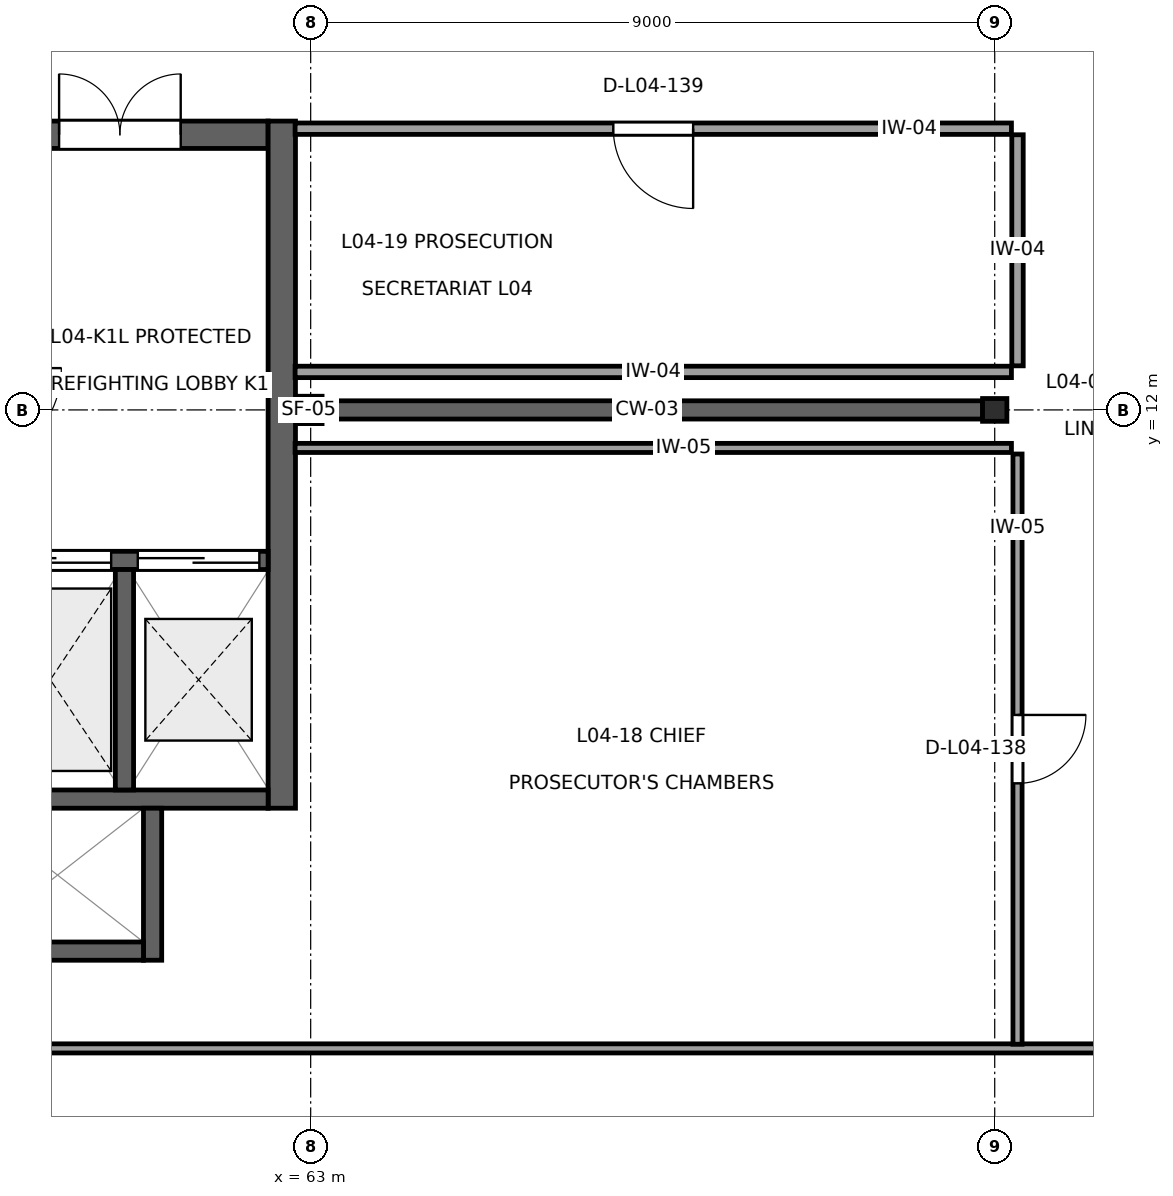
"""IFC4 building model, lengths in metres.
Left out: names, types, materials, properties, quantities, classifications, styles, units other than length and angle.
Written with IfcOpenShell. Run it as: python <this file> out.ifc"""

import sys

from ifc_helpers import new_model, si_unit, direction, frame, frame_2d, origin, origin_2d, place, context, subcontext, project, spatial, rectangle, i_section, extrude, element, fill, save


model = new_model("IFC4")
c1 = context("Model", 3, precision=1e-05, world=origin(), true_north=direction((0.0, 1.0)))
c2 = subcontext(c1, "Body", "Model", "MODEL_VIEW")
j1 = project(units=[si_unit("LENGTHUNIT", "METRE"), si_unit("PLANEANGLEUNIT", "RADIAN")], contexts=[c1])
p1 = place(None, origin())
s1 = spatial("IfcSite", under=j1, at=p1, CompositionType="ELEMENT")
p2 = place(p1, origin())
s2 = spatial("IfcBuilding", under=s1, at=p2, CompositionType="ELEMENT")
p3 = place(p2, frame((0.0, 0.0, 18.9)))
s3 = spatial("IfcBuildingStorey", under=s2, at=p3, CompositionType="ELEMENT", Elevation=18.9)
p4 = place(p3, frame((63.0, 12.0, 0.0), z_axis=(0.0, 0.0, 1.0), x_axis=(1.0, 0.0, 0.0)))
e1 = element("IfcColumn", 1, at=p4, inside=s3, PredefinedType="COLUMN", context=c2, shape_type="SweptSolid", body=[
    extrude(i_section(OverallWidth=0.3, OverallDepth=0.36, WebThickness=0.012, FlangeThickness=0.022, at=origin_2d()), origin(), (0.0, 0.0, 1.0), 4.5),
])
p5 = place(p3, frame((72.0, 12.0, 0.0), z_axis=(0.0, 0.0, 1.0), x_axis=(0.0, 1.0, 0.0)))
e2 = element("IfcColumn", 2, at=p5, inside=s3, PredefinedType="COLUMN", context=c2, shape_type="SweptSolid", body=[
    extrude(i_section(OverallWidth=0.3, OverallDepth=0.32, WebThickness=0.011, FlangeThickness=0.021, at=origin_2d()), origin(), (0.0, 0.0, 1.0), 4.5),
])
p6 = place(p3, frame((58.54, 15.62, 0.0), z_axis=(0.0, 0.0, 1.0), x_axis=(1.0, 0.0, 0.0)))
e3 = element("IfcWall", 3, at=p6, inside=s3, PredefinedType="SHEAR", context=c2, shape_type="SweptSolid", body=[
    extrude(rectangle(XDim=3.9, YDim=0.36, at=frame_2d((1.95, 0.0))), origin(), (0.0, 0.0, 1.0), 4.16),
])
p7 = place(p6, frame((1.15, 0.0, 0.0)))
e4 = element("IfcOpeningElement", 4, at=p7, cuts=e3, PredefinedType="OPENING", context=c2, shape_type="SweptSolid", body=[
    extrude(rectangle(XDim=1.6, YDim=2.25, at=frame_2d((0.8, 1.125))), frame((0.0, 0.195, 0.0), z_axis=(0.0, -1.0, 0.0), x_axis=(1.0, 0.0, 0.0)), (0.0, 0.0, 1.0), 0.39),
])
p8 = place(p3, frame((62.62, 6.76, 0.0), z_axis=(0.0, 0.0, 1.0), x_axis=(0.0, 1.0, 0.0)))
e5 = element("IfcWall", 5, at=p8, inside=s3, PredefinedType="SHEAR", context=c2, shape_type="SweptSolid", body=[
    extrude(rectangle(XDim=9.04, YDim=0.36, at=frame_2d((4.52, 0.0))), origin(), (0.0, 0.0, 1.0), 4.16),
])
p9 = place(p3, frame((58.54, 10.02, 0.0), z_axis=(0.0, 0.0, 1.0), x_axis=(1.0, 0.0, 0.0)))
e6 = element("IfcWall", 6, at=p9, inside=s3, PredefinedType="SHEAR", context=c2, shape_type="SweptSolid", body=[
    extrude(rectangle(XDim=3.9, YDim=0.24, at=frame_2d((1.95, 0.0))), origin(), (0.0, 0.0, 1.0), 4.31),
])
p10 = place(p9, frame((0.235, 0.0, 0.0)))
e7 = element("IfcOpeningElement", 7, at=p10, cuts=e6, PredefinedType="OPENING", context=c2, shape_type="SweptSolid", body=[
    extrude(rectangle(XDim=1.6, YDim=2.3, at=frame_2d((0.8, 1.15))), frame((0.0, 0.135, 0.0), z_axis=(0.0, -1.0, 0.0), x_axis=(1.0, 0.0, 0.0)), (0.0, 0.0, 1.0), 0.27),
])
p11 = place(p9, frame((2.185, 0.0, 0.0)))
e8 = element("IfcOpeningElement", 8, at=p11, cuts=e6, PredefinedType="OPENING", context=c2, shape_type="SweptSolid", body=[
    extrude(rectangle(XDim=1.6, YDim=2.3, at=frame_2d((0.8, 1.15))), frame((0.0, 0.135, 0.0), z_axis=(0.0, -1.0, 0.0), x_axis=(1.0, 0.0, 0.0)), (0.0, 0.0, 1.0), 0.27),
])
p12 = place(p3, frame((58.54, 6.88, 0.0), z_axis=(0.0, 0.0, 1.0), x_axis=(1.0, 0.0, 0.0)))
e9 = element("IfcWall", 9, at=p12, inside=s3, PredefinedType="SHEAR", context=c2, shape_type="SweptSolid", body=[
    extrude(rectangle(XDim=3.9, YDim=0.24, at=frame_2d((1.95, 0.0))), origin(), (0.0, 0.0, 1.0), 4.31),
])
p13 = place(p3, frame((60.55, 7.0, 0.0), z_axis=(0.0, 0.0, 1.0), x_axis=(0.0, 1.0, 0.0)))
e10 = element("IfcWall", 10, at=p13, inside=s3, PredefinedType="SHEAR", context=c2, shape_type="SweptSolid", body=[
    extrude(rectangle(XDim=2.9, YDim=0.24, at=frame_2d((1.45, 0.0))), origin(), (0.0, 0.0, 1.0), 4.31),
])
p14 = place(p3, frame((60.92, 4.76, 0.0), z_axis=(0.0, 0.0, 1.0), x_axis=(0.0, 1.0, 0.0)))
e11 = element("IfcWall", 11, at=p14, inside=s3, PredefinedType="SHEAR", context=c2, shape_type="SweptSolid", body=[
    extrude(rectangle(XDim=2.0, YDim=0.24, at=frame_2d((1.0, 0.0))), origin(), (0.0, 0.0, 1.0), 4.31),
])
p15 = place(p3, frame((58.54, 4.88, 0.0), z_axis=(0.0, 0.0, 1.0), x_axis=(1.0, 0.0, 0.0)))
e12 = element("IfcWall", 12, at=p15, inside=s3, PredefinedType="SHEAR", context=c2, shape_type="SweptSolid", body=[
    extrude(rectangle(XDim=2.26, YDim=0.24, at=frame_2d((1.13, 0.0))), origin(), (0.0, 0.0, 1.0), 4.31),
])
p16 = place(p3, frame((63.008, 12.0, 0.0), z_axis=(0.0, 0.0, 1.0), x_axis=(1.0, 0.0, 0.0)))
e13 = element("IfcWall", 13, at=p16, inside=s3, PredefinedType="SHEAR", context=c2, shape_type="SweptSolid", body=[
    extrude(rectangle(XDim=8.834, YDim=0.24, at=frame_2d((4.417, 0.0))), origin(), (0.0, 0.0, 1.0), 3.355),
])
p17 = place(p3, frame((53.87, 3.6, 0.0), z_axis=(0.0, 0.0, 1.0), x_axis=(1.0, 0.0, 0.0)))
e14 = element("IfcWall", 14, at=p17, inside=s3, PredefinedType="PARTITIONING", context=c2, shape_type="SweptSolid", body=[
    extrude(rectangle(XDim=63.25, YDim=0.12, at=frame_2d((31.625, 0.0))), origin(), (0.0, 0.0, 1.0), 4.14),
])
p18 = place(p17, frame((19.855, 0.0, 0.0)))
e15 = element("IfcOpeningElement", 15, at=p18, cuts=e14, PredefinedType="OPENING", context=c2, shape_type="SweptSolid", body=[
    extrude(rectangle(XDim=0.95, YDim=2.15, at=frame_2d((0.475, 1.075))), frame((0.0, 0.075, 0.0), z_axis=(0.0, -1.0, 0.0), x_axis=(1.0, 0.0, 0.0)), (0.0, 0.0, 1.0), 0.15),
])
p19 = place(p3, frame((72.3, 11.42, 0.0), z_axis=(0.0, 0.0, 1.0), x_axis=(0.0, -1.0, 0.0)))
e16 = element("IfcWall", 16, at=p19, inside=s3, PredefinedType="PARTITIONING", context=c2, shape_type="SweptSolid", body=[
    extrude(rectangle(XDim=7.765, YDim=0.12, at=frame_2d((3.882, 0.0))), origin(), (0.0, 0.0, 1.0), 4.14),
])
p20 = place(p19, frame((3.433, 0.0, 0.0)))
e17 = element("IfcOpeningElement", 17, at=p20, cuts=e16, PredefinedType="OPENING", context=c2, shape_type="SweptSolid", body=[
    extrude(rectangle(XDim=0.9, YDim=2.1, at=frame_2d((0.45, 1.05))), frame((0.0, 0.075, 0.0), z_axis=(0.0, -1.0, 0.0), x_axis=(1.0, 0.0, 0.0)), (0.0, 0.0, 1.0), 0.15),
])
p21 = place(p3, frame((62.795, 11.5, 0.0), z_axis=(0.0, 0.0, 1.0), x_axis=(1.0, 0.0, 0.0)))
e18 = element("IfcWall", 18, at=p21, inside=s3, PredefinedType="PARTITIONING", context=c2, shape_type="SweptSolid", body=[
    extrude(rectangle(XDim=9.425, YDim=0.12, at=frame_2d((4.712, 0.0))), origin(), (0.0, 0.0, 1.0), 4.14),
])
p22 = place(p3, frame((62.795, 15.7, 0.0), z_axis=(0.0, 0.0, 1.0), x_axis=(1.0, 0.0, 0.0)))
e19 = element("IfcWall", 19, at=p22, inside=s3, PredefinedType="PARTITIONING", context=c2, shape_type="SweptSolid", body=[
    extrude(rectangle(XDim=9.425, YDim=0.15, at=frame_2d((4.712, 0.0))), origin(), (0.0, 0.0, 1.0), 4.14),
])
p23 = place(p22, frame((4.187, 0.0, 0.0)))
e20 = element("IfcOpeningElement", 20, at=p23, cuts=e19, PredefinedType="OPENING", context=c2, shape_type="SweptSolid", body=[
    extrude(rectangle(XDim=1.05, YDim=2.25, at=frame_2d((0.525, 1.125))), frame((0.0, 0.09, 0.0), z_axis=(0.0, -1.0, 0.0), x_axis=(1.0, 0.0, 0.0)), (0.0, 0.0, 1.0), 0.18),
])
p24 = place(p3, frame((72.3, 15.62, 0.0), z_axis=(0.0, 0.0, 1.0), x_axis=(0.0, -1.0, 0.0)))
e21 = element("IfcWall", 21, at=p24, inside=s3, PredefinedType="PARTITIONING", context=c2, shape_type="SweptSolid", body=[
    extrude(rectangle(XDim=3.04, YDim=0.15, at=frame_2d((1.52, 0.0))), origin(), (0.0, 0.0, 1.0), 4.14),
])
p25 = place(p3, frame((72.22, 12.5, 0.0), z_axis=(0.0, 0.0, 1.0), x_axis=(-1.0, 0.0, 0.0)))
e22 = element("IfcWall", 22, at=p25, inside=s3, PredefinedType="PARTITIONING", context=c2, shape_type="SweptSolid", body=[
    extrude(rectangle(XDim=9.425, YDim=0.15, at=frame_2d((4.712, 0.0))), origin(), (0.0, 0.0, 1.0), 4.14),
])
p26 = place(p7, origin())
e23 = element("IfcDoor", 23, at=p26, inside=s3, OperationType="DOUBLE_DOOR_SINGLE_SWING", PredefinedType="DOOR", context=c2, shape_type="SweptSolid", body=[
    extrude(rectangle(XDim=1.6, YDim=2.25, at=frame_2d((0.8, 1.125))), frame((0.0, 0.025, 0.0), z_axis=(0.0, -1.0, 0.0), x_axis=(1.0, 0.0, 0.0)), (0.0, 0.0, 1.0), 0.05),
])
fill(e4, e23)
p27 = place(p10, origin())
e24 = element("IfcDoor", 24, at=p27, inside=s3, OperationType="DOUBLE_DOOR_SLIDING", PredefinedType="DOOR", context=c2, shape_type="SweptSolid", body=[
    extrude(rectangle(XDim=1.6, YDim=2.3, at=frame_2d((0.8, 1.15))), frame((0.0, 0.025, 0.0), z_axis=(0.0, -1.0, 0.0), x_axis=(1.0, 0.0, 0.0)), (0.0, 0.0, 1.0), 0.05),
])
fill(e7, e24)
p28 = place(p11, origin())
e25 = element("IfcDoor", 25, at=p28, inside=s3, OperationType="DOUBLE_DOOR_SLIDING", PredefinedType="DOOR", context=c2, shape_type="SweptSolid", body=[
    extrude(rectangle(XDim=1.6, YDim=2.3, at=frame_2d((0.8, 1.15))), frame((0.0, 0.025, 0.0), z_axis=(0.0, -1.0, 0.0), x_axis=(1.0, 0.0, 0.0)), (0.0, 0.0, 1.0), 0.05),
])
fill(e8, e25)
p29 = place(p20, origin())
e26 = element("IfcDoor", 26, at=p29, inside=s3, OperationType="SINGLE_SWING_LEFT", PredefinedType="DOOR", context=c2, shape_type="SweptSolid", body=[
    extrude(rectangle(XDim=0.9, YDim=2.1, at=frame_2d((0.45, 1.05))), frame((0.0, 0.025, 0.0), z_axis=(0.0, -1.0, 0.0), x_axis=(1.0, 0.0, 0.0)), (0.0, 0.0, 1.0), 0.05),
])
fill(e17, e26)
p30 = place(p23, frame((1.05, 0.0, 0.0), z_axis=(0.0, 0.0, 1.0), x_axis=(-1.0, 0.0, 0.0)))
e27 = element("IfcDoor", 27, at=p30, inside=s3, OperationType="SINGLE_SWING_RIGHT", PredefinedType="DOOR", context=c2, shape_type="SweptSolid", body=[
    extrude(rectangle(XDim=1.05, YDim=2.25, at=frame_2d((0.525, 1.125))), frame((0.0, 0.025, 0.0), z_axis=(0.0, -1.0, 0.0), x_axis=(1.0, 0.0, 0.0)), (0.0, 0.0, 1.0), 0.05),
])
fill(e20, e27)
save(model, sys.argv[1])
